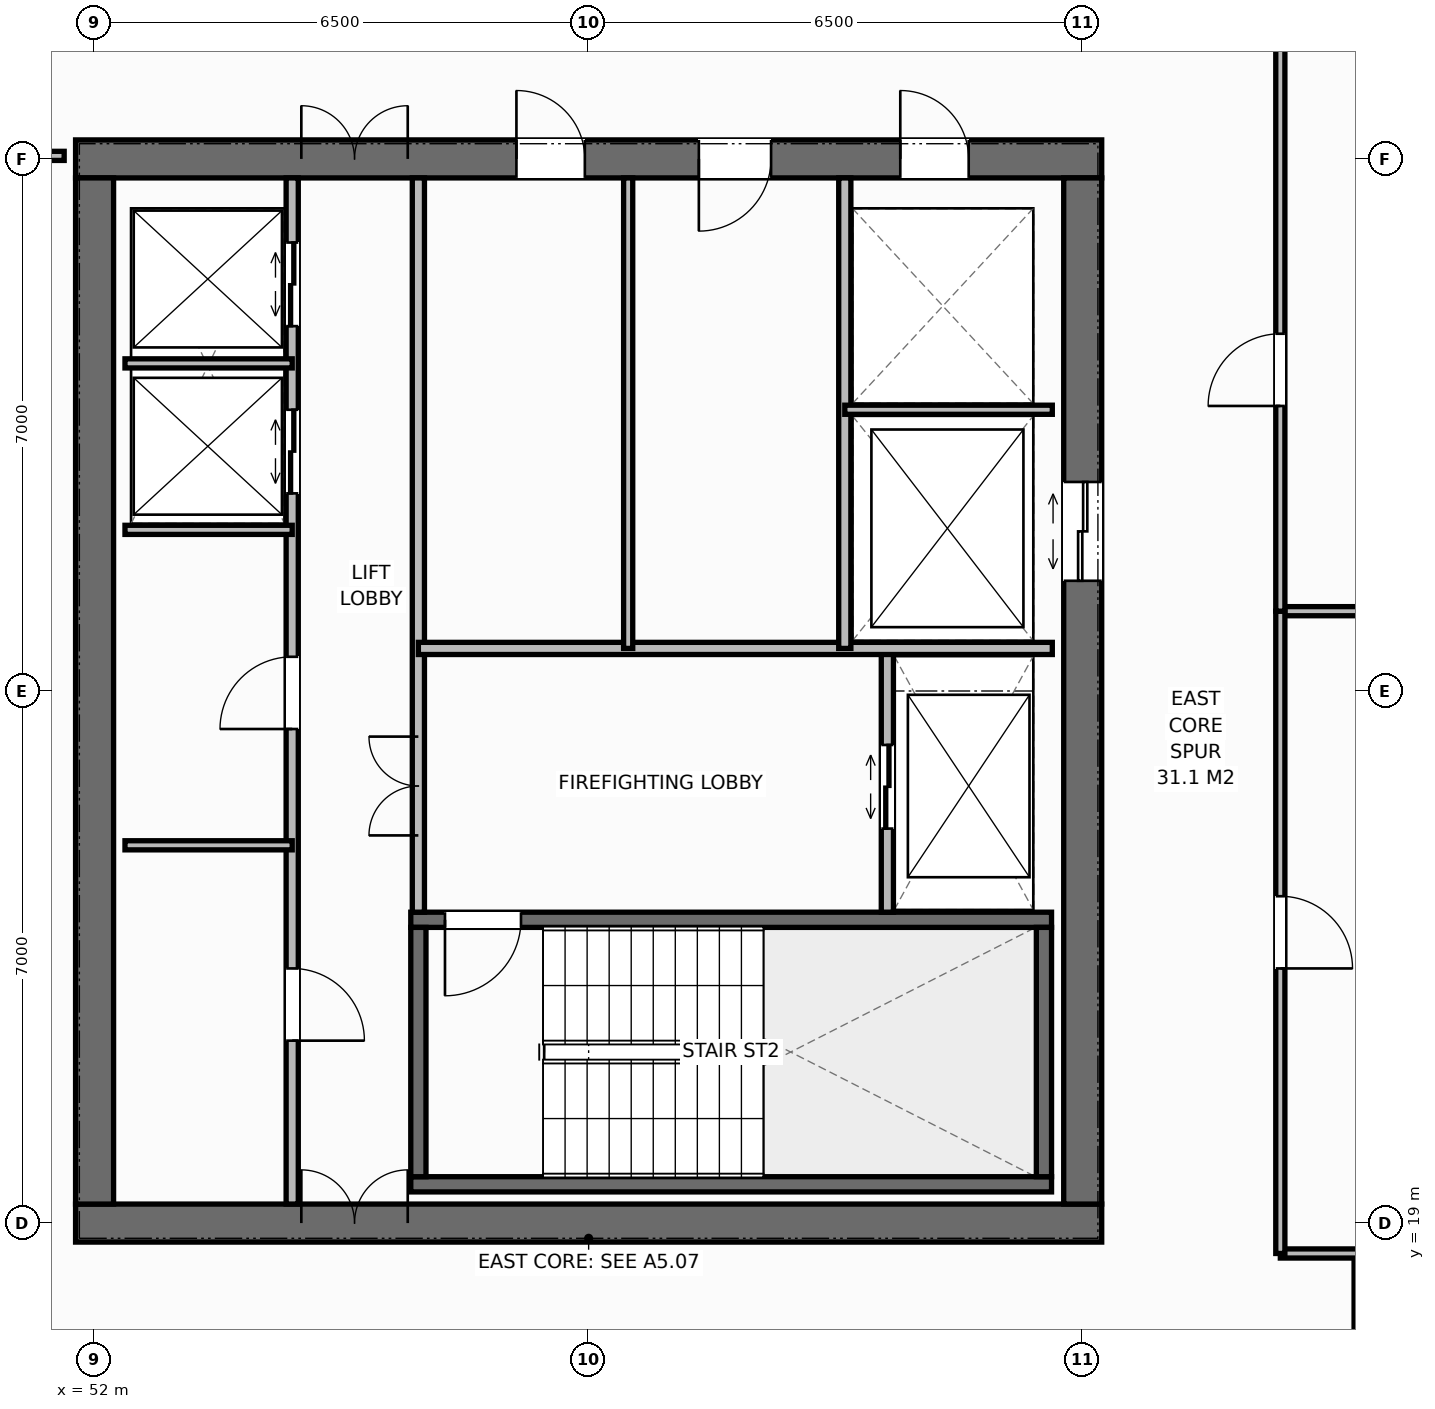
"""IFC4 building model, lengths in metres.
Left out: names, types, materials, properties, quantities, classifications, styles, units other than length and angle.
Written with IfcOpenShell. Run it as: python <this file> out.ifc"""

import sys

from ifc_helpers import new_model, si_unit, direction, frame, frame_2d, origin, place, context, subcontext, project, spatial, rectangle, extrude, element, fill, save


model = new_model("IFC4")
c1 = context("Model", 3, precision=1e-05, world=origin(), true_north=direction((0.0, 1.0)))
c2 = subcontext(c1, "Body", "Model", "MODEL_VIEW")
j1 = project(units=[si_unit("LENGTHUNIT", "METRE"), si_unit("PLANEANGLEUNIT", "RADIAN")], contexts=[c1])
p1 = place(None, origin())
s1 = spatial("IfcSite", under=j1, at=p1, CompositionType="ELEMENT")
p2 = place(p1, origin())
s2 = spatial("IfcBuilding", under=s1, at=p2, CompositionType="ELEMENT")
p3 = place(p2, frame((0.0, 0.0, 236.6)))
s3 = spatial("IfcBuildingStorey", under=s2, at=p3, CompositionType="ELEMENT", Elevation=236.6)
p4 = place(p3, frame((51.75, 19.0, 0.0), z_axis=(0.0, 0.0, 1.0), x_axis=(1.0, 0.0, 0.0)))
e1 = element("IfcWall", 1, at=p4, inside=s3, PredefinedType="SHEAR", context=c2, shape_type="SweptSolid", body=[
    extrude(rectangle(XDim=13.5, YDim=0.5, at=frame_2d((6.75, 0.0))), origin(), (0.0, 0.0, 1.0), 3.8),
])
p5 = place(p4, frame((2.97, 0.0, 0.0)))
e2 = element("IfcOpeningElement", 2, at=p5, cuts=e1, PredefinedType="OPENING", context=c2, shape_type="SweptSolid", body=[
    extrude(rectangle(XDim=1.4, YDim=2.2, at=frame_2d((0.7, 1.1))), frame((0.0, 0.26, 0.0), z_axis=(0.0, -1.0, 0.0), x_axis=(1.0, 0.0, 0.0)), (0.0, 0.0, 1.0), 0.52),
])
p6 = place(p3, frame((51.75, 33.0, 0.0), z_axis=(0.0, 0.0, 1.0), x_axis=(1.0, 0.0, 0.0)))
e3 = element("IfcWall", 3, at=p6, inside=s3, PredefinedType="SHEAR", context=c2, shape_type="SweptSolid", body=[
    extrude(rectangle(XDim=13.5, YDim=0.5, at=frame_2d((6.75, 0.0))), origin(), (0.0, 0.0, 1.0), 3.8),
])
p7 = place(p6, frame((2.97, 0.0, 0.0)))
e4 = element("IfcOpeningElement", 4, at=p7, cuts=e3, PredefinedType="OPENING", context=c2, shape_type="SweptSolid", body=[
    extrude(rectangle(XDim=1.4, YDim=2.2, at=frame_2d((0.7, 1.1))), frame((0.0, 0.26, 0.0), z_axis=(0.0, -1.0, 0.0), x_axis=(1.0, 0.0, 0.0)), (0.0, 0.0, 1.0), 0.52),
])
p8 = place(p6, frame((10.85, 0.0, 0.0)))
e5 = element("IfcOpeningElement", 5, at=p8, cuts=e3, PredefinedType="OPENING", context=c2, shape_type="SweptSolid", body=[
    extrude(rectangle(XDim=0.9, YDim=2.15, at=frame_2d((0.45, 1.075))), frame((0.0, 0.26, 0.0), z_axis=(0.0, -1.0, 0.0), x_axis=(1.0, 0.0, 0.0)), (0.0, 0.0, 1.0), 0.52),
])
p9 = place(p6, frame((5.8, 0.0, 0.0)))
e6 = element("IfcOpeningElement", 6, at=p9, cuts=e3, PredefinedType="OPENING", context=c2, shape_type="SweptSolid", body=[
    extrude(rectangle(XDim=0.9, YDim=2.15, at=frame_2d((0.45, 1.075))), frame((0.0, 0.26, 0.0), z_axis=(0.0, -1.0, 0.0), x_axis=(1.0, 0.0, 0.0)), (0.0, 0.0, 1.0), 0.52),
])
p10 = place(p6, frame((8.2, 0.0, 0.0)))
e7 = element("IfcOpeningElement", 7, at=p10, cuts=e3, PredefinedType="OPENING", context=c2, shape_type="SweptSolid", body=[
    extrude(rectangle(XDim=0.95, YDim=2.15, at=frame_2d((0.475, 1.075))), frame((0.0, 0.26, 0.0), z_axis=(0.0, -1.0, 0.0), x_axis=(1.0, 0.0, 0.0)), (0.0, 0.0, 1.0), 0.52),
])
p11 = place(p3, frame((52.0, 19.25, 0.0), z_axis=(0.0, 0.0, 1.0), x_axis=(0.0, 1.0, 0.0)))
e8 = element("IfcWall", 8, at=p11, inside=s3, PredefinedType="SHEAR", context=c2, shape_type="SweptSolid", body=[
    extrude(rectangle(XDim=13.5, YDim=0.5, at=frame_2d((6.75, 0.0))), origin(), (0.0, 0.0, 1.0), 3.8),
])
p12 = place(p3, frame((65.0, 19.25, 0.0), z_axis=(0.0, 0.0, 1.0), x_axis=(0.0, 1.0, 0.0)))
e9 = element("IfcWall", 9, at=p12, inside=s3, PredefinedType="SHEAR", context=c2, shape_type="SweptSolid", body=[
    extrude(rectangle(XDim=13.5, YDim=0.5, at=frame_2d((6.75, 0.0))), origin(), (0.0, 0.0, 1.0), 3.8),
])
p13 = place(p12, frame((8.2, 0.0, 0.0)))
e10 = element("IfcOpeningElement", 10, at=p13, cuts=e9, PredefinedType="OPENING", context=c2, shape_type="SweptSolid", body=[
    extrude(rectangle(XDim=1.3, YDim=2.2, at=frame_2d((0.65, 1.1))), frame((0.0, 0.26, 0.0), z_axis=(0.0, -1.0, 0.0), x_axis=(1.0, 0.0, 0.0)), (0.0, 0.0, 1.0), 0.52),
])
p14 = place(p3, frame((56.16, 19.51, 0.0), z_axis=(0.0, 0.0, 1.0), x_axis=(1.0, 0.0, 0.0)))
e11 = element("IfcWall", 11, at=p14, inside=s3, PredefinedType="SHEAR", context=c2, shape_type="SweptSolid", body=[
    extrude(rectangle(XDim=8.43, YDim=0.2, at=frame_2d((4.215, 0.0))), origin(), (0.0, 0.0, 1.0), 3.8),
])
p15 = place(p3, frame((56.16, 22.99, 0.0), z_axis=(0.0, 0.0, 1.0), x_axis=(1.0, 0.0, 0.0)))
e12 = element("IfcWall", 12, at=p15, inside=s3, PredefinedType="SHEAR", context=c2, shape_type="SweptSolid", body=[
    extrude(rectangle(XDim=8.43, YDim=0.2, at=frame_2d((4.215, 0.0))), origin(), (0.0, 0.0, 1.0), 3.8),
])
p16 = place(p15, frame((0.45, 0.0, 0.0)))
e13 = element("IfcOpeningElement", 13, at=p16, cuts=e12, PredefinedType="OPENING", context=c2, shape_type="SweptSolid", body=[
    extrude(rectangle(XDim=1.0, YDim=2.15, at=frame_2d((0.5, 1.075))), frame((0.0, 0.11, 0.0), z_axis=(0.0, -1.0, 0.0), x_axis=(1.0, 0.0, 0.0)), (0.0, 0.0, 1.0), 0.22),
])
for number, where, z_axis, x_axis in (
    (14, (56.26, 19.61, 0.0), (0.0, 0.0, 1.0), (0.0, 1.0, 0.0)),
    (15, (64.49, 19.61, 0.0), (0.0, 0.0, 1.0), (0.0, 1.0, 0.0)),
):
    element("IfcWall", number, at=place(p3, frame(where, z_axis=z_axis, x_axis=x_axis)), inside=s3, PredefinedType="SHEAR", context=c2, shape_type="SweptSolid", body=[
        extrude(rectangle(XDim=3.28, YDim=0.2, at=frame_2d((1.64, 0.0))), origin(), (0.0, 0.0, 1.0), 3.8),
    ])
p17 = place(p3, frame((54.6, 19.25, 0.0), z_axis=(0.0, 0.0, 1.0), x_axis=(0.0, 1.0, 0.0)))
e16 = element("IfcWall", 16, at=p17, inside=s3, PredefinedType="STANDARD", context=c2, shape_type="SweptSolid", body=[
    extrude(rectangle(XDim=13.5, YDim=0.16, at=frame_2d((6.75, 0.0))), origin(), (0.0, 0.0, 1.0), 3.58),
])
p18 = place(p17, frame((2.15, 0.0, 0.0)))
e17 = element("IfcOpeningElement", 17, at=p18, cuts=e16, PredefinedType="OPENING", context=c2, shape_type="SweptSolid", body=[
    extrude(rectangle(XDim=0.95, YDim=2.15, at=frame_2d((0.475, 1.075))), frame((0.0, 0.09, 0.0), z_axis=(0.0, -1.0, 0.0), x_axis=(1.0, 0.0, 0.0)), (0.0, 0.0, 1.0), 0.18),
])
p19 = place(p17, frame((6.25, 0.0, 0.0)))
e18 = element("IfcOpeningElement", 18, at=p19, cuts=e16, PredefinedType="OPENING", context=c2, shape_type="SweptSolid", body=[
    extrude(rectangle(XDim=0.95, YDim=2.15, at=frame_2d((0.475, 1.075))), frame((0.0, 0.09, 0.0), z_axis=(0.0, -1.0, 0.0), x_axis=(1.0, 0.0, 0.0)), (0.0, 0.0, 1.0), 0.18),
])
p20 = place(p17, frame((9.35, 0.0, 0.0)))
e19 = element("IfcOpeningElement", 19, at=p20, cuts=e16, PredefinedType="OPENING", context=c2, shape_type="SweptSolid", body=[
    extrude(rectangle(XDim=1.1, YDim=2.2, at=frame_2d((0.55, 1.1))), frame((0.0, 0.09, 0.0), z_axis=(0.0, -1.0, 0.0), x_axis=(1.0, 0.0, 0.0)), (0.0, 0.0, 1.0), 0.18),
])
p21 = place(p17, frame((11.55, 0.0, 0.0)))
e20 = element("IfcOpeningElement", 20, at=p21, cuts=e16, PredefinedType="OPENING", context=c2, shape_type="SweptSolid", body=[
    extrude(rectangle(XDim=1.1, YDim=2.2, at=frame_2d((0.55, 1.1))), frame((0.0, 0.09, 0.0), z_axis=(0.0, -1.0, 0.0), x_axis=(1.0, 0.0, 0.0)), (0.0, 0.0, 1.0), 0.18),
])
p22 = place(p3, frame((56.26, 23.09, 0.0), z_axis=(0.0, 0.0, 1.0), x_axis=(0.0, 1.0, 0.0)))
e21 = element("IfcWall", 21, at=p22, inside=s3, PredefinedType="STANDARD", context=c2, shape_type="SweptSolid", body=[
    extrude(rectangle(XDim=9.66, YDim=0.16, at=frame_2d((4.83, 0.0))), origin(), (0.0, 0.0, 1.0), 3.58),
])
p23 = place(p22, frame((1.01, 0.0, 0.0)))
e22 = element("IfcOpeningElement", 22, at=p23, cuts=e21, PredefinedType="OPENING", context=c2, shape_type="SweptSolid", body=[
    extrude(rectangle(XDim=1.3, YDim=2.2, at=frame_2d((0.65, 1.1))), frame((0.0, 0.09, 0.0), z_axis=(0.0, -1.0, 0.0), x_axis=(1.0, 0.0, 0.0)), (0.0, 0.0, 1.0), 0.18),
])
for number, where, z_axis, x_axis in (
    (23, (52.4, 23.97, 0.0), (0.0, 0.0, 1.0), (1.0, 0.0, 0.0)),
    (24, (52.4, 28.12, 0.0), (0.0, 0.0, 1.0), (1.0, 0.0, 0.0)),
    (25, (52.4, 30.31, 0.0), (0.0, 0.0, 1.0), (1.0, 0.0, 0.0)),
):
    element("IfcWall", number, at=place(p3, frame(where, z_axis=z_axis, x_axis=x_axis)), inside=s3, PredefinedType="PARTITIONING", context=c2, shape_type="SweptSolid", body=[
        extrude(rectangle(XDim=2.2, YDim=0.12, at=frame_2d((1.1, 0.0))), origin(), (0.0, 0.0, 1.0), 3.58),
    ])
p24 = place(p3, frame((62.43, 23.09, 0.0), z_axis=(0.0, 0.0, 1.0), x_axis=(0.0, 1.0, 0.0)))
e26 = element("IfcWall", 26, at=p24, inside=s3, PredefinedType="STANDARD", context=c2, shape_type="SweptSolid", body=[
    extrude(rectangle(XDim=3.47, YDim=0.16, at=frame_2d((1.735, 0.0))), origin(), (0.0, 0.0, 1.0), 3.58),
])
p25 = place(p24, frame((1.1, 0.0, 0.0)))
e27 = element("IfcOpeningElement", 27, at=p25, cuts=e26, PredefinedType="OPENING", context=c2, shape_type="SweptSolid", body=[
    extrude(rectangle(XDim=1.1, YDim=2.2, at=frame_2d((0.55, 1.1))), frame((0.0, 0.09, 0.0), z_axis=(0.0, -1.0, 0.0), x_axis=(1.0, 0.0, 0.0)), (0.0, 0.0, 1.0), 0.18),
])
p26 = place(p3, frame((56.26, 26.56, 0.0), z_axis=(0.0, 0.0, 1.0), x_axis=(1.0, 0.0, 0.0)))
e28 = element("IfcWall", 28, at=p26, inside=s3, PredefinedType="STANDARD", context=c2, shape_type="SweptSolid", body=[
    extrude(rectangle(XDim=8.34, YDim=0.16, at=frame_2d((4.17, 0.0))), origin(), (0.0, 0.0, 1.0), 3.58),
])
p27 = place(p3, frame((61.87, 26.56, 0.0), z_axis=(0.0, 0.0, 1.0), x_axis=(0.0, 1.0, 0.0)))
e29 = element("IfcWall", 29, at=p27, inside=s3, PredefinedType="STANDARD", context=c2, shape_type="SweptSolid", body=[
    extrude(rectangle(XDim=6.19, YDim=0.16, at=frame_2d((3.095, 0.0))), origin(), (0.0, 0.0, 1.0), 3.58),
])
p28 = place(p3, frame((61.87, 29.7, 0.0), z_axis=(0.0, 0.0, 1.0), x_axis=(1.0, 0.0, 0.0)))
e30 = element("IfcWall", 30, at=p28, inside=s3, PredefinedType="PARTITIONING", context=c2, shape_type="SweptSolid", body=[
    extrude(rectangle(XDim=2.73, YDim=0.12, at=frame_2d((1.365, 0.0))), origin(), (0.0, 0.0, 1.0), 3.58),
])
p29 = place(p3, frame((59.02, 26.56, 0.0), z_axis=(0.0, 0.0, 1.0), x_axis=(0.0, 1.0, 0.0)))
e31 = element("IfcWall", 31, at=p29, inside=s3, PredefinedType="PARTITIONING", context=c2, shape_type="SweptSolid", body=[
    extrude(rectangle(XDim=6.19, YDim=0.12, at=frame_2d((3.095, 0.0))), origin(), (0.0, 0.0, 1.0), 3.58),
])
p30 = place(p3, frame((48.0, 33.04, 0.0), z_axis=(0.0, 0.0, 1.0), x_axis=(1.0, 0.0, 0.0)))
e32 = element("IfcWall", 32, at=p30, inside=s3, PredefinedType="PARTITIONING", context=c2, shape_type="SweptSolid", body=[
    extrude(rectangle(XDim=3.6, YDim=0.12, at=frame_2d((1.8, 0.0))), origin(), (0.0, 0.0, 1.0), 3.32),
])
p31 = place(p30, frame((1.1, 0.0, 0.0)))
e33 = element("IfcOpeningElement", 33, at=p31, cuts=e32, PredefinedType="OPENING", context=c2, shape_type="SweptSolid", body=[
    extrude(rectangle(XDim=0.95, YDim=2.15, at=frame_2d((0.475, 1.075))), frame((0.0, 0.07, 0.0), z_axis=(0.0, -1.0, 0.0), x_axis=(1.0, 0.0, 0.0)), (0.0, 0.0, 1.0), 0.14),
])
p32 = place(p3, frame((68.63, 16.5, 0.0), z_axis=(0.0, 0.0, 1.0), x_axis=(0.0, 1.0, 0.0)))
e34 = element("IfcWall", 34, at=p32, inside=s3, PredefinedType="PARTITIONING", context=c2, shape_type="SweptSolid", body=[
    extrude(rectangle(XDim=2.1, YDim=0.12, at=frame_2d((1.05, 0.0))), origin(), (0.0, 0.0, 1.0), 3.58),
])
for number, where, z_axis, x_axis in (
    (35, (67.6, 18.6, 0.0), (0.0, 0.0, 1.0), (1.0, 0.0, 0.0)),
    (36, (67.6, 27.05, 0.0), (0.0, 0.0, 1.0), (1.0, 0.0, 0.0)),
):
    element("IfcWall", number, at=place(p3, frame(where, z_axis=z_axis, x_axis=x_axis)), inside=s3, PredefinedType="PARTITIONING", context=c2, shape_type="SweptSolid", body=[
        extrude(rectangle(XDim=4.58, YDim=0.12, at=frame_2d((2.29, 0.0))), origin(), (0.0, 0.0, 1.0), 3.58),
    ])
p33 = place(p3, frame((67.6, 18.6, 0.0), z_axis=(0.0, 0.0, 1.0), x_axis=(0.0, 1.0, 0.0)))
e37 = element("IfcWall", 37, at=p33, inside=s3, PredefinedType="PARTITIONING", context=c2, shape_type="SweptSolid", body=[
    extrude(rectangle(XDim=8.45, YDim=0.12, at=frame_2d((4.225, 0.0))), origin(), (0.0, 0.0, 1.0), 3.58),
])
p34 = place(p33, frame((3.75, 0.0, 0.0)))
e38 = element("IfcOpeningElement", 38, at=p34, cuts=e37, PredefinedType="OPENING", context=c2, shape_type="SweptSolid", body=[
    extrude(rectangle(XDim=0.95, YDim=2.15, at=frame_2d((0.475, 1.075))), frame((0.0, 0.07, 0.0), z_axis=(0.0, -1.0, 0.0), x_axis=(1.0, 0.0, 0.0)), (0.0, 0.0, 1.0), 0.14),
])
p35 = place(p3, frame((67.6, 27.05, 0.0), z_axis=(0.0, 0.0, 1.0), x_axis=(0.0, 1.0, 0.0)))
e39 = element("IfcWall", 39, at=p35, inside=s3, PredefinedType="PARTITIONING", context=c2, shape_type="SweptSolid", body=[
    extrude(rectangle(XDim=8.45, YDim=0.12, at=frame_2d((4.225, 0.0))), origin(), (0.0, 0.0, 1.0), 3.58),
])
p36 = place(p35, frame((2.7, 0.0, 0.0)))
e40 = element("IfcOpeningElement", 40, at=p36, cuts=e39, PredefinedType="OPENING", context=c2, shape_type="SweptSolid", body=[
    extrude(rectangle(XDim=0.95, YDim=2.15, at=frame_2d((0.475, 1.075))), frame((0.0, 0.07, 0.0), z_axis=(0.0, -1.0, 0.0), x_axis=(1.0, 0.0, 0.0)), (0.0, 0.0, 1.0), 0.14),
])
p37 = place(p5, origin())
e41 = element("IfcDoor", 41, at=p37, inside=s3, OperationType="DOUBLE_DOOR_SINGLE_SWING", PredefinedType="DOOR", context=c2, shape_type="SweptSolid", body=[
    extrude(rectangle(XDim=1.4, YDim=2.2, at=frame_2d((0.7, 1.1))), frame((0.0, 0.075, 0.0), z_axis=(0.0, -1.0, 0.0), x_axis=(1.0, 0.0, 0.0)), (0.0, 0.0, 1.0), 0.05),
])
fill(e2, e41)
p38 = place(p7, origin())
e42 = element("IfcDoor", 42, at=p38, inside=s3, OperationType="DOUBLE_DOOR_SINGLE_SWING", PredefinedType="DOOR", context=c2, shape_type="SweptSolid", body=[
    extrude(rectangle(XDim=1.4, YDim=2.2, at=frame_2d((0.7, 1.1))), frame((0.0, -0.025, 0.0), z_axis=(0.0, -1.0, 0.0), x_axis=(1.0, 0.0, 0.0)), (0.0, 0.0, 1.0), 0.05),
])
fill(e4, e42)
p39 = place(p18, origin())
e43 = element("IfcDoor", 43, at=p39, inside=s3, OperationType="SINGLE_SWING_RIGHT", PredefinedType="DOOR", context=c2, shape_type="SweptSolid", body=[
    extrude(rectangle(XDim=0.95, YDim=2.15, at=frame_2d((0.475, 1.075))), frame((0.0, 0.025, 0.0), z_axis=(0.0, -1.0, 0.0), x_axis=(1.0, 0.0, 0.0)), (0.0, 0.0, 1.0), 0.05),
])
fill(e17, e43)
p40 = place(p19, origin())
e44 = element("IfcDoor", 44, at=p40, inside=s3, OperationType="SINGLE_SWING_LEFT", PredefinedType="DOOR", context=c2, shape_type="SweptSolid", body=[
    extrude(rectangle(XDim=0.95, YDim=2.15, at=frame_2d((0.475, 1.075))), frame((0.0, 0.025, 0.0), z_axis=(0.0, -1.0, 0.0), x_axis=(1.0, 0.0, 0.0)), (0.0, 0.0, 1.0), 0.05),
])
fill(e18, e44)
p41 = place(p20, origin())
e45 = element("IfcDoor", 45, at=p41, inside=s3, OperationType="DOUBLE_DOOR_SLIDING", PredefinedType="DOOR", context=c2, shape_type="SweptSolid", body=[
    extrude(rectangle(XDim=1.1, YDim=2.2, at=frame_2d((0.55, 1.1))), frame((0.0, 0.025, 0.0), z_axis=(0.0, -1.0, 0.0), x_axis=(1.0, 0.0, 0.0)), (0.0, 0.0, 1.0), 0.05),
])
fill(e19, e45)
p42 = place(p21, origin())
e46 = element("IfcDoor", 46, at=p42, inside=s3, OperationType="DOUBLE_DOOR_SLIDING", PredefinedType="DOOR", context=c2, shape_type="SweptSolid", body=[
    extrude(rectangle(XDim=1.1, YDim=2.2, at=frame_2d((0.55, 1.1))), frame((0.0, 0.025, 0.0), z_axis=(0.0, -1.0, 0.0), x_axis=(1.0, 0.0, 0.0)), (0.0, 0.0, 1.0), 0.05),
])
fill(e20, e46)
p43 = place(p16, origin())
e47 = element("IfcDoor", 47, at=p43, inside=s3, OperationType="SINGLE_SWING_RIGHT", PredefinedType="DOOR", context=c2, shape_type="SweptSolid", body=[
    extrude(rectangle(XDim=1.0, YDim=2.15, at=frame_2d((0.5, 1.075))), frame((0.0, 0.025, 0.0), z_axis=(0.0, -1.0, 0.0), x_axis=(1.0, 0.0, 0.0)), (0.0, 0.0, 1.0), 0.05),
])
fill(e13, e47)
p44 = place(p25, origin())
e48 = element("IfcDoor", 48, at=p44, inside=s3, OperationType="DOUBLE_DOOR_SLIDING", PredefinedType="DOOR", context=c2, shape_type="SweptSolid", body=[
    extrude(rectangle(XDim=1.1, YDim=2.2, at=frame_2d((0.55, 1.1))), frame((0.0, 0.025, 0.0), z_axis=(0.0, -1.0, 0.0), x_axis=(1.0, 0.0, 0.0)), (0.0, 0.0, 1.0), 0.05),
])
fill(e27, e48)
p45 = place(p23, origin())
e49 = element("IfcDoor", 49, at=p45, inside=s3, OperationType="DOUBLE_DOOR_SINGLE_SWING", PredefinedType="DOOR", context=c2, shape_type="SweptSolid", body=[
    extrude(rectangle(XDim=1.3, YDim=2.2, at=frame_2d((0.65, 1.1))), frame((0.0, 0.025, 0.0), z_axis=(0.0, -1.0, 0.0), x_axis=(1.0, 0.0, 0.0)), (0.0, 0.0, 1.0), 0.05),
])
fill(e22, e49)
p46 = place(p13, origin())
e50 = element("IfcDoor", 50, at=p46, inside=s3, OperationType="DOUBLE_DOOR_SLIDING", PredefinedType="DOOR", context=c2, shape_type="SweptSolid", body=[
    extrude(rectangle(XDim=1.3, YDim=2.2, at=frame_2d((0.65, 1.1))), frame((0.0, 0.025, 0.0), z_axis=(0.0, -1.0, 0.0), x_axis=(1.0, 0.0, 0.0)), (0.0, 0.0, 1.0), 0.05),
])
fill(e10, e50)
p47 = place(p8, origin())
e51 = element("IfcDoor", 51, at=p47, inside=s3, OperationType="SINGLE_SWING_LEFT", PredefinedType="DOOR", context=c2, shape_type="SweptSolid", body=[
    extrude(rectangle(XDim=0.9, YDim=2.15, at=frame_2d((0.45, 1.075))), frame((0.0, -0.025, 0.0), z_axis=(0.0, -1.0, 0.0), x_axis=(1.0, 0.0, 0.0)), (0.0, 0.0, 1.0), 0.05),
])
fill(e5, e51)
p48 = place(p9, origin())
e52 = element("IfcDoor", 52, at=p48, inside=s3, OperationType="SINGLE_SWING_LEFT", PredefinedType="DOOR", context=c2, shape_type="SweptSolid", body=[
    extrude(rectangle(XDim=0.9, YDim=2.15, at=frame_2d((0.45, 1.075))), frame((0.0, -0.025, 0.0), z_axis=(0.0, -1.0, 0.0), x_axis=(1.0, 0.0, 0.0)), (0.0, 0.0, 1.0), 0.05),
])
fill(e6, e52)
p49 = place(p10, origin())
e53 = element("IfcDoor", 53, at=p49, inside=s3, OperationType="SINGLE_SWING_RIGHT", PredefinedType="DOOR", context=c2, shape_type="SweptSolid", body=[
    extrude(rectangle(XDim=0.95, YDim=2.15, at=frame_2d((0.475, 1.075))), frame((0.0, -0.025, 0.0), z_axis=(0.0, -1.0, 0.0), x_axis=(1.0, 0.0, 0.0)), (0.0, 0.0, 1.0), 0.05),
])
fill(e7, e53)
p50 = place(p34, origin())
e54 = element("IfcDoor", 54, at=p50, inside=s3, OperationType="SINGLE_SWING_RIGHT", PredefinedType="DOOR", context=c2, shape_type="SweptSolid", body=[
    extrude(rectangle(XDim=0.95, YDim=2.15, at=frame_2d((0.475, 1.075))), frame((0.0, 0.025, 0.0), z_axis=(0.0, -1.0, 0.0), x_axis=(1.0, 0.0, 0.0)), (0.0, 0.0, 1.0), 0.05),
])
fill(e38, e54)
p51 = place(p36, origin())
e55 = element("IfcDoor", 55, at=p51, inside=s3, OperationType="SINGLE_SWING_LEFT", PredefinedType="DOOR", context=c2, shape_type="SweptSolid", body=[
    extrude(rectangle(XDim=0.95, YDim=2.15, at=frame_2d((0.475, 1.075))), frame((0.0, 0.025, 0.0), z_axis=(0.0, -1.0, 0.0), x_axis=(1.0, 0.0, 0.0)), (0.0, 0.0, 1.0), 0.05),
])
fill(e40, e55)
save(model, sys.argv[1])
